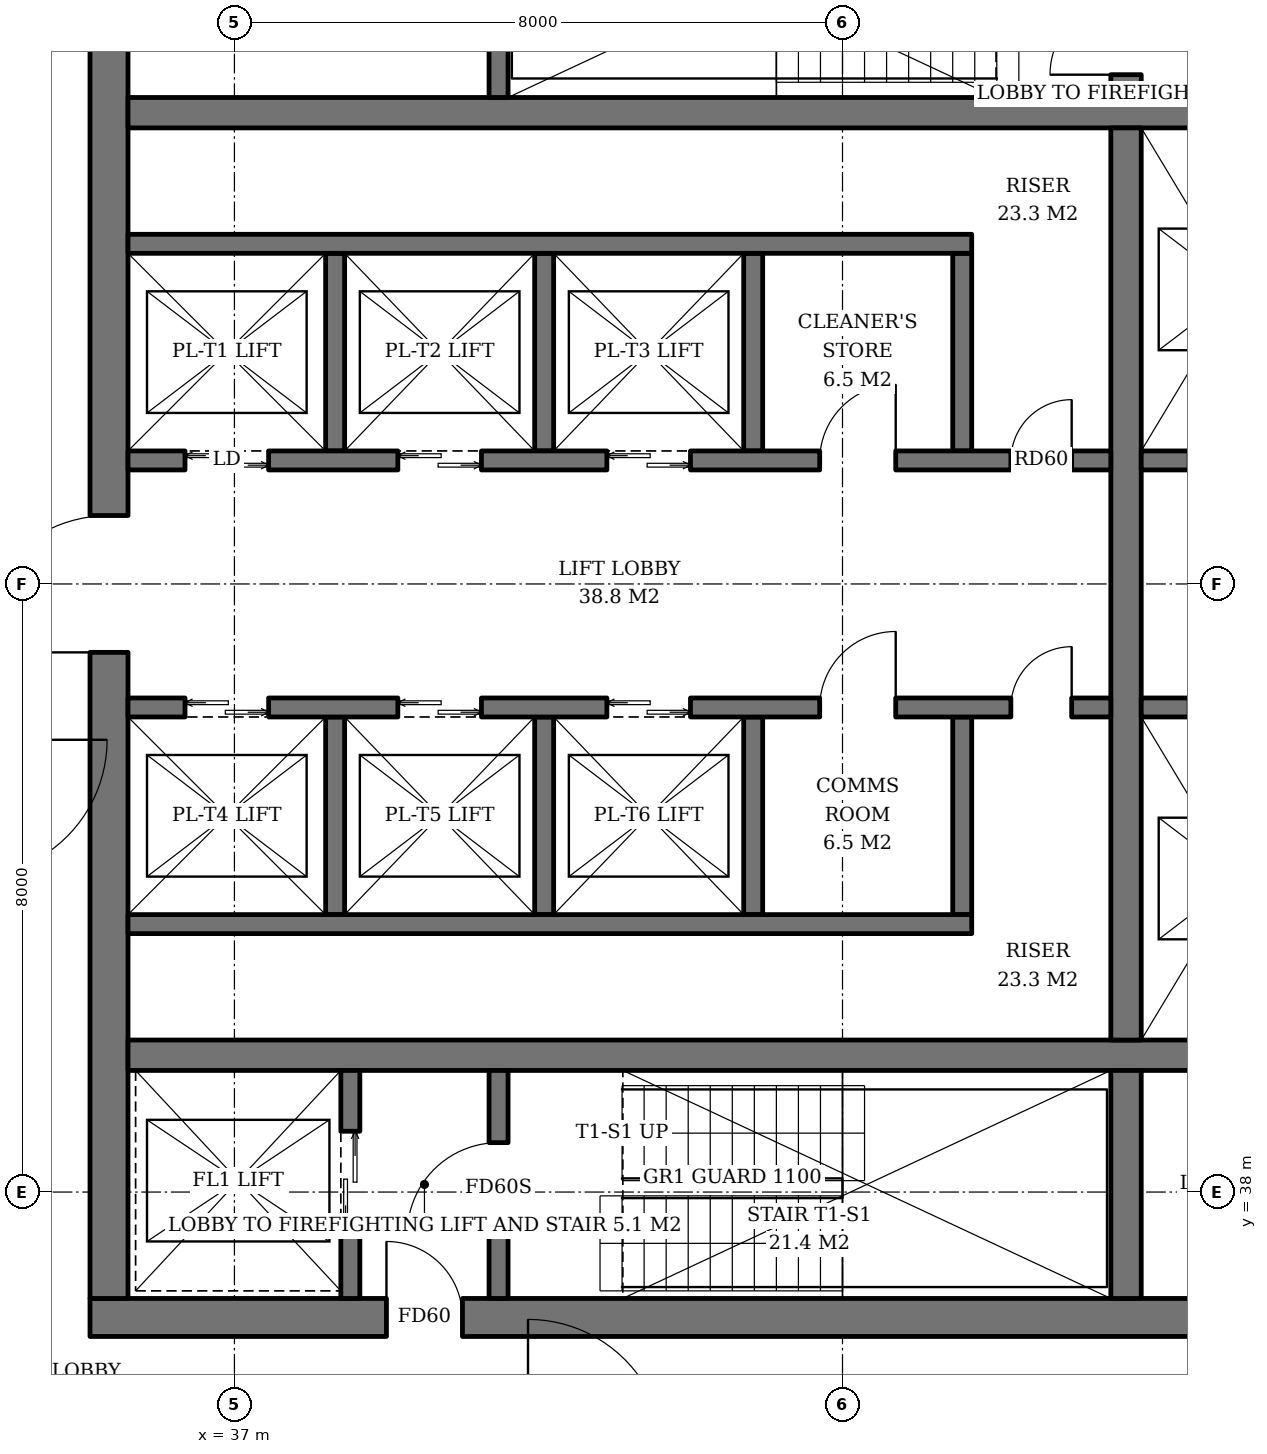
"""IFC4 building model, lengths in metres.
Left out: names, types, materials, properties, quantities, classifications, styles, units other than length and angle.
Written with IfcOpenShell. Run it as: python <this file> out.ifc"""

import sys

from ifc_helpers import new_model, si_unit, direction, frame, frame_2d, origin, place, context, subcontext, project, spatial, rectangle, extrude, element, fill, save


model = new_model("IFC4")
c1 = context("Model", 3, precision=1e-05, world=origin(), true_north=direction((0.0, 1.0)))
c2 = subcontext(c1, "Body", "Model", "MODEL_VIEW")
j1 = project(units=[si_unit("LENGTHUNIT", "METRE"), si_unit("PLANEANGLEUNIT", "RADIAN")], contexts=[c1])
p1 = place(None, origin())
s1 = spatial("IfcSite", under=j1, at=p1, CompositionType="ELEMENT")
p2 = place(p1, origin())
s2 = spatial("IfcBuilding", under=s1, at=p2, CompositionType="ELEMENT")
p3 = place(p2, frame((0.0, 0.0, 233.8)))
s3 = spatial("IfcBuildingStorey", under=s2, at=p3, CompositionType="ELEMENT", Elevation=233.8)
p4 = place(p3, frame((35.1, 36.35, 0.0), z_axis=(0.0, 0.0, 1.0), x_axis=(1.0, 0.0, 0.0)))
e1 = element("IfcWall", 1, at=p4, inside=s3, PredefinedType="SHEAR", context=c2, shape_type="SweptSolid", body=[
    extrude(rectangle(XDim=19.8, YDim=0.5, at=frame_2d((9.9, 0.0))), origin(), (0.0, 0.0, 1.0), 3.8),
])
p5 = place(p4, frame((3.9, 0.0, 0.0)))
e2 = element("IfcOpeningElement", 2, at=p5, cuts=e1, PredefinedType="OPENING", context=c2, shape_type="SweptSolid", body=[
    extrude(rectangle(XDim=1.0, YDim=2.1, at=frame_2d((0.5, 1.05))), frame((0.0, 0.26, 0.0), z_axis=(0.0, -1.0, 0.0), x_axis=(1.0, 0.0, 0.0)), (0.0, 0.0, 1.0), 0.52),
])
p6 = place(p4, frame((15.35, 0.0, 0.0)))
e3 = element("IfcOpeningElement", 3, at=p6, cuts=e1, PredefinedType="OPENING", context=c2, shape_type="SweptSolid", body=[
    extrude(rectangle(XDim=1.0, YDim=2.1, at=frame_2d((0.5, 1.05))), frame((0.0, 0.26, 0.0), z_axis=(0.0, -1.0, 0.0), x_axis=(1.0, 0.0, 0.0)), (0.0, 0.0, 1.0), 0.52),
])
p7 = place(p3, frame((35.35, 36.6, 0.0), z_axis=(0.0, 0.0, 1.0), x_axis=(0.0, 1.0, 0.0)))
e4 = element("IfcWall", 4, at=p7, inside=s3, PredefinedType="SHEAR", context=c2, shape_type="SweptSolid", body=[
    extrude(rectangle(XDim=18.8, YDim=0.5, at=frame_2d((9.4, 0.0))), origin(), (0.0, 0.0, 1.0), 3.8),
])
p8 = place(p7, frame((8.5, 0.0, 0.0)))
e5 = element("IfcOpeningElement", 5, at=p8, cuts=e4, PredefinedType="OPENING", context=c2, shape_type="SweptSolid", body=[
    extrude(rectangle(XDim=1.8, YDim=2.4, at=frame_2d((0.9, 1.2))), frame((0.0, 0.26, 0.0), z_axis=(0.0, -1.0, 0.0), x_axis=(1.0, 0.0, 0.0)), (0.0, 0.0, 1.0), 0.52),
])
for number, where, z_axis, x_axis in (
    (6, (35.6, 39.8, 0.0), (0.0, 0.0, 1.0), (1.0, 0.0, 0.0)),
    (7, (35.6, 52.2, 0.0), (0.0, 0.0, 1.0), (1.0, 0.0, 0.0)),
):
    element("IfcWall", number, at=place(p3, frame(where, z_axis=z_axis, x_axis=x_axis)), inside=s3, PredefinedType="SHEAR", context=c2, shape_type="SweptSolid", body=[
        extrude(rectangle(XDim=18.8, YDim=0.4, at=frame_2d((9.4, 0.0))), origin(), (0.0, 0.0, 1.0), 3.8),
    ])
p9 = place(p3, frame((48.73, 36.6, 0.0), z_axis=(0.0, 0.0, 1.0), x_axis=(0.0, 1.0, 0.0)))
e8 = element("IfcWall", 8, at=p9, inside=s3, PredefinedType="SHEAR", context=c2, shape_type="SweptSolid", body=[
    extrude(rectangle(XDim=3.0, YDim=0.4, at=frame_2d((1.5, 0.0))), origin(), (0.0, 0.0, 1.0), 3.8),
])
p10 = place(p3, frame((48.73, 40.0, 0.0), z_axis=(0.0, 0.0, 1.0), x_axis=(0.0, 1.0, 0.0)))
e9 = element("IfcWall", 9, at=p10, inside=s3, PredefinedType="SHEAR", context=c2, shape_type="SweptSolid", body=[
    extrude(rectangle(XDim=12.0, YDim=0.4, at=frame_2d((6.0, 0.0))), origin(), (0.0, 0.0, 1.0), 3.8),
])
p11 = place(p3, frame((48.73, 52.4, 0.0), z_axis=(0.0, 0.0, 1.0), x_axis=(0.0, 1.0, 0.0)))
e10 = element("IfcWall", 10, at=p11, inside=s3, PredefinedType="SHEAR", context=c2, shape_type="SweptSolid", body=[
    extrude(rectangle(XDim=3.0, YDim=0.4, at=frame_2d((1.5, 0.0))), origin(), (0.0, 0.0, 1.0), 3.8),
])
p12 = place(p11, frame((0.3, 0.0, 0.0)))
e11 = element("IfcOpeningElement", 11, at=p12, cuts=e10, PredefinedType="OPENING", context=c2, shape_type="SweptSolid", body=[
    extrude(rectangle(XDim=1.0, YDim=2.1, at=frame_2d((0.5, 1.05))), frame((0.0, 0.21, 0.0), z_axis=(0.0, -1.0, 0.0), x_axis=(1.0, 0.0, 0.0)), (0.0, 0.0, 1.0), 0.42),
])
p13 = place(p3, frame((38.525, 36.6, 0.0), z_axis=(0.0, 0.0, 1.0), x_axis=(0.0, 1.0, 0.0)))
e12 = element("IfcWall", 12, at=p13, inside=s3, PredefinedType="SHEAR", context=c2, shape_type="SweptSolid", body=[
    extrude(rectangle(XDim=3.0, YDim=0.25, at=frame_2d((1.5, 0.0))), origin(), (0.0, 0.0, 1.0), 3.8),
])
p14 = place(p13, frame((0.9, 0.0, 0.0)))
e13 = element("IfcOpeningElement", 13, at=p14, cuts=e12, PredefinedType="OPENING", context=c2, shape_type="SweptSolid", body=[
    extrude(rectangle(XDim=1.3, YDim=2.2, at=frame_2d((0.65, 1.1))), frame((0.0, 0.135, 0.0), z_axis=(0.0, -1.0, 0.0), x_axis=(1.0, 0.0, 0.0)), (0.0, 0.0, 1.0), 0.27),
])
p15 = place(p3, frame((40.475, 36.6, 0.0), z_axis=(0.0, 0.0, 1.0), x_axis=(0.0, 1.0, 0.0)))
e14 = element("IfcWall", 14, at=p15, inside=s3, PredefinedType="SHEAR", context=c2, shape_type="SweptSolid", body=[
    extrude(rectangle(XDim=3.0, YDim=0.25, at=frame_2d((1.5, 0.0))), origin(), (0.0, 0.0, 1.0), 3.8),
])
p16 = place(p15, frame((0.85, 0.0, 0.0)))
e15 = element("IfcOpeningElement", 15, at=p16, cuts=e14, PredefinedType="OPENING", context=c2, shape_type="SweptSolid", body=[
    extrude(rectangle(XDim=1.2, YDim=2.1, at=frame_2d((0.6, 1.05))), frame((0.0, 0.135, 0.0), z_axis=(0.0, -1.0, 0.0), x_axis=(1.0, 0.0, 0.0)), (0.0, 0.0, 1.0), 0.27),
])
p17 = place(p3, frame((40.475, 52.4, 0.0), z_axis=(0.0, 0.0, 1.0), x_axis=(0.0, 1.0, 0.0)))
e16 = element("IfcWall", 16, at=p17, inside=s3, PredefinedType="SHEAR", context=c2, shape_type="SweptSolid", body=[
    extrude(rectangle(XDim=3.0, YDim=0.25, at=frame_2d((1.5, 0.0))), origin(), (0.0, 0.0, 1.0), 3.8),
])
for number, where, z_axis, x_axis in (
    (17, (38.325, 47.75, 0.0), (0.0, 0.0, 1.0), (0.0, 1.0, 0.0)),
    (18, (41.075, 47.75, 0.0), (0.0, 0.0, 1.0), (0.0, 1.0, 0.0)),
    (19, (43.825, 47.75, 0.0), (0.0, 0.0, 1.0), (0.0, 1.0, 0.0)),
    (20, (46.575, 47.75, 0.0), (0.0, 0.0, 1.0), (0.0, 1.0, 0.0)),
):
    element("IfcWall", number, at=place(p3, frame(where, z_axis=z_axis, x_axis=x_axis)), inside=s3, PredefinedType="SHEAR", context=c2, shape_type="SweptSolid", body=[
        extrude(rectangle(XDim=2.6, YDim=0.25, at=frame_2d((1.3, 0.0))), origin(), (0.0, 0.0, 1.0), 3.8),
    ])
p18 = place(p3, frame((35.6, 50.475, 0.0), z_axis=(0.0, 0.0, 1.0), x_axis=(1.0, 0.0, 0.0)))
e21 = element("IfcWall", 21, at=p18, inside=s3, PredefinedType="SHEAR", context=c2, shape_type="SweptSolid", body=[
    extrude(rectangle(XDim=11.1, YDim=0.25, at=frame_2d((5.55, 0.0))), origin(), (0.0, 0.0, 1.0), 3.8),
])
p19 = place(p3, frame((35.6, 47.625, 0.0), z_axis=(0.0, 0.0, 1.0), x_axis=(1.0, 0.0, 0.0)))
e22 = element("IfcWall", 22, at=p19, inside=s3, PredefinedType="SHEAR", context=c2, shape_type="SweptSolid", body=[
    extrude(rectangle(XDim=12.93, YDim=0.25, at=frame_2d((6.465, 0.0))), origin(), (0.0, 0.0, 1.0), 3.8),
])
p20 = place(p19, frame((0.75, 0.0, 0.0)))
e23 = element("IfcOpeningElement", 23, at=p20, cuts=e22, PredefinedType="OPENING", context=c2, shape_type="SweptSolid", body=[
    extrude(rectangle(XDim=1.1, YDim=2.2, at=frame_2d((0.55, 1.1))), frame((0.0, 0.135, 0.0), z_axis=(0.0, -1.0, 0.0), x_axis=(1.0, 0.0, 0.0)), (0.0, 0.0, 1.0), 0.27),
])
p21 = place(p19, frame((3.55, 0.0, 0.0)))
e24 = element("IfcOpeningElement", 24, at=p21, cuts=e22, PredefinedType="OPENING", context=c2, shape_type="SweptSolid", body=[
    extrude(rectangle(XDim=1.1, YDim=2.2, at=frame_2d((0.55, 1.1))), frame((0.0, 0.135, 0.0), z_axis=(0.0, -1.0, 0.0), x_axis=(1.0, 0.0, 0.0)), (0.0, 0.0, 1.0), 0.27),
])
p22 = place(p19, frame((6.3, 0.0, 0.0)))
e25 = element("IfcOpeningElement", 25, at=p22, cuts=e22, PredefinedType="OPENING", context=c2, shape_type="SweptSolid", body=[
    extrude(rectangle(XDim=1.1, YDim=2.2, at=frame_2d((0.55, 1.1))), frame((0.0, 0.135, 0.0), z_axis=(0.0, -1.0, 0.0), x_axis=(1.0, 0.0, 0.0)), (0.0, 0.0, 1.0), 0.27),
])
p23 = place(p19, frame((9.1, 0.0, 0.0)))
e26 = element("IfcOpeningElement", 26, at=p23, cuts=e22, PredefinedType="OPENING", context=c2, shape_type="SweptSolid", body=[
    extrude(rectangle(XDim=1.0, YDim=2.1, at=frame_2d((0.5, 1.05))), frame((0.0, 0.135, 0.0), z_axis=(0.0, -1.0, 0.0), x_axis=(1.0, 0.0, 0.0)), (0.0, 0.0, 1.0), 0.27),
])
p24 = place(p19, frame((11.615, 0.0, 0.0)))
e27 = element("IfcOpeningElement", 27, at=p24, cuts=e22, PredefinedType="OPENING", context=c2, shape_type="SweptSolid", body=[
    extrude(rectangle(XDim=0.8, YDim=2.0, at=frame_2d((0.4, 1.0))), frame((0.0, 0.135, 0.0), z_axis=(0.0, -1.0, 0.0), x_axis=(1.0, 0.0, 0.0)), (0.0, 0.0, 1.0), 0.27),
])
for number, where, z_axis, x_axis in (
    (28, (38.325, 44.25, 0.0), (0.0, 0.0, 1.0), (0.0, -1.0, 0.0)),
    (29, (41.075, 44.25, 0.0), (0.0, 0.0, 1.0), (0.0, -1.0, 0.0)),
    (30, (43.825, 44.25, 0.0), (0.0, 0.0, 1.0), (0.0, -1.0, 0.0)),
    (31, (46.575, 44.25, 0.0), (0.0, 0.0, 1.0), (0.0, -1.0, 0.0)),
):
    element("IfcWall", number, at=place(p3, frame(where, z_axis=z_axis, x_axis=x_axis)), inside=s3, PredefinedType="SHEAR", context=c2, shape_type="SweptSolid", body=[
        extrude(rectangle(XDim=2.6, YDim=0.25, at=frame_2d((1.3, 0.0))), origin(), (0.0, 0.0, 1.0), 3.8),
    ])
p25 = place(p3, frame((35.6, 41.525, 0.0), z_axis=(0.0, 0.0, 1.0), x_axis=(1.0, 0.0, 0.0)))
e32 = element("IfcWall", 32, at=p25, inside=s3, PredefinedType="SHEAR", context=c2, shape_type="SweptSolid", body=[
    extrude(rectangle(XDim=11.1, YDim=0.25, at=frame_2d((5.55, 0.0))), origin(), (0.0, 0.0, 1.0), 3.8),
])
p26 = place(p3, frame((35.6, 44.375, 0.0), z_axis=(0.0, 0.0, 1.0), x_axis=(1.0, 0.0, 0.0)))
e33 = element("IfcWall", 33, at=p26, inside=s3, PredefinedType="SHEAR", context=c2, shape_type="SweptSolid", body=[
    extrude(rectangle(XDim=12.93, YDim=0.25, at=frame_2d((6.465, 0.0))), origin(), (0.0, 0.0, 1.0), 3.8),
])
p27 = place(p26, frame((0.75, 0.0, 0.0)))
e34 = element("IfcOpeningElement", 34, at=p27, cuts=e33, PredefinedType="OPENING", context=c2, shape_type="SweptSolid", body=[
    extrude(rectangle(XDim=1.1, YDim=2.2, at=frame_2d((0.55, 1.1))), frame((0.0, 0.135, 0.0), z_axis=(0.0, -1.0, 0.0), x_axis=(1.0, 0.0, 0.0)), (0.0, 0.0, 1.0), 0.27),
])
p28 = place(p26, frame((3.55, 0.0, 0.0)))
e35 = element("IfcOpeningElement", 35, at=p28, cuts=e33, PredefinedType="OPENING", context=c2, shape_type="SweptSolid", body=[
    extrude(rectangle(XDim=1.1, YDim=2.2, at=frame_2d((0.55, 1.1))), frame((0.0, 0.135, 0.0), z_axis=(0.0, -1.0, 0.0), x_axis=(1.0, 0.0, 0.0)), (0.0, 0.0, 1.0), 0.27),
])
p29 = place(p26, frame((6.3, 0.0, 0.0)))
e36 = element("IfcOpeningElement", 36, at=p29, cuts=e33, PredefinedType="OPENING", context=c2, shape_type="SweptSolid", body=[
    extrude(rectangle(XDim=1.1, YDim=2.2, at=frame_2d((0.55, 1.1))), frame((0.0, 0.135, 0.0), z_axis=(0.0, -1.0, 0.0), x_axis=(1.0, 0.0, 0.0)), (0.0, 0.0, 1.0), 0.27),
])
p30 = place(p26, frame((9.1, 0.0, 0.0)))
e37 = element("IfcOpeningElement", 37, at=p30, cuts=e33, PredefinedType="OPENING", context=c2, shape_type="SweptSolid", body=[
    extrude(rectangle(XDim=1.0, YDim=2.1, at=frame_2d((0.5, 1.05))), frame((0.0, 0.135, 0.0), z_axis=(0.0, -1.0, 0.0), x_axis=(1.0, 0.0, 0.0)), (0.0, 0.0, 1.0), 0.27),
])
p31 = place(p26, frame((11.615, 0.0, 0.0)))
e38 = element("IfcOpeningElement", 38, at=p31, cuts=e33, PredefinedType="OPENING", context=c2, shape_type="SweptSolid", body=[
    extrude(rectangle(XDim=0.8, YDim=2.0, at=frame_2d((0.4, 1.0))), frame((0.0, 0.135, 0.0), z_axis=(0.0, -1.0, 0.0), x_axis=(1.0, 0.0, 0.0)), (0.0, 0.0, 1.0), 0.27),
])
p32 = place(p3, frame((48.93, 47.625, 0.0), z_axis=(0.0, 0.0, 1.0), x_axis=(1.0, 0.0, 0.0)))
e39 = element("IfcWall", 39, at=p32, inside=s3, PredefinedType="SHEAR", context=c2, shape_type="SweptSolid", body=[
    extrude(rectangle(XDim=5.47, YDim=0.25, at=frame_2d((2.735, 0.0))), origin(), (0.0, 0.0, 1.0), 3.8),
])
p33 = place(p32, frame((0.63, 0.0, 0.0)))
e40 = element("IfcOpeningElement", 40, at=p33, cuts=e39, PredefinedType="OPENING", context=c2, shape_type="SweptSolid", body=[
    extrude(rectangle(XDim=1.3, YDim=2.2, at=frame_2d((0.65, 1.1))), frame((0.0, 0.135, 0.0), z_axis=(0.0, -1.0, 0.0), x_axis=(1.0, 0.0, 0.0)), (0.0, 0.0, 1.0), 0.27),
])
p34 = place(p32, frame((3.49, 0.0, 0.0)))
e41 = element("IfcOpeningElement", 41, at=p34, cuts=e39, PredefinedType="OPENING", context=c2, shape_type="SweptSolid", body=[
    extrude(rectangle(XDim=1.3, YDim=2.2, at=frame_2d((0.65, 1.1))), frame((0.0, 0.135, 0.0), z_axis=(0.0, -1.0, 0.0), x_axis=(1.0, 0.0, 0.0)), (0.0, 0.0, 1.0), 0.27),
])
p35 = place(p3, frame((48.93, 44.375, 0.0), z_axis=(0.0, 0.0, 1.0), x_axis=(1.0, 0.0, 0.0)))
e42 = element("IfcWall", 42, at=p35, inside=s3, PredefinedType="SHEAR", context=c2, shape_type="SweptSolid", body=[
    extrude(rectangle(XDim=5.47, YDim=0.25, at=frame_2d((2.735, 0.0))), origin(), (0.0, 0.0, 1.0), 3.8),
])
p36 = place(p35, frame((0.63, 0.0, 0.0)))
e43 = element("IfcOpeningElement", 43, at=p36, cuts=e42, PredefinedType="OPENING", context=c2, shape_type="SweptSolid", body=[
    extrude(rectangle(XDim=1.3, YDim=2.2, at=frame_2d((0.65, 1.1))), frame((0.0, 0.135, 0.0), z_axis=(0.0, -1.0, 0.0), x_axis=(1.0, 0.0, 0.0)), (0.0, 0.0, 1.0), 0.27),
])
p37 = place(p35, frame((3.49, 0.0, 0.0)))
e44 = element("IfcOpeningElement", 44, at=p37, cuts=e42, PredefinedType="OPENING", context=c2, shape_type="SweptSolid", body=[
    extrude(rectangle(XDim=1.3, YDim=2.2, at=frame_2d((0.65, 1.1))), frame((0.0, 0.135, 0.0), z_axis=(0.0, -1.0, 0.0), x_axis=(1.0, 0.0, 0.0)), (0.0, 0.0, 1.0), 0.27),
])
p38 = place(p14, origin())
e45 = element("IfcDoor", 45, at=p38, inside=s3, OperationType="DOUBLE_DOOR_SLIDING", PredefinedType="DOOR", context=c2, shape_type="SweptSolid", body=[
    extrude(rectangle(XDim=1.3, YDim=2.2, at=frame_2d((0.65, 1.1))), frame((0.0, 0.025, 0.0), z_axis=(0.0, -1.0, 0.0), x_axis=(1.0, 0.0, 0.0)), (0.0, 0.0, 1.0), 0.05),
])
fill(e13, e45)
p39 = place(p16, origin())
e46 = element("IfcDoor", 46, at=p39, inside=s3, OperationType="SINGLE_SWING_LEFT", PredefinedType="DOOR", context=c2, shape_type="SweptSolid", body=[
    extrude(rectangle(XDim=1.2, YDim=2.1, at=frame_2d((0.6, 1.05))), frame((0.0, 0.025, 0.0), z_axis=(0.0, -1.0, 0.0), x_axis=(1.0, 0.0, 0.0)), (0.0, 0.0, 1.0), 0.05),
])
fill(e15, e46)
p40 = place(p20, origin())
e47 = element("IfcDoor", 47, at=p40, inside=s3, OperationType="DOUBLE_DOOR_SLIDING", PredefinedType="DOOR", context=c2, shape_type="SweptSolid", body=[
    extrude(rectangle(XDim=1.1, YDim=2.2, at=frame_2d((0.55, 1.1))), frame((0.0, 0.025, 0.0), z_axis=(0.0, -1.0, 0.0), x_axis=(1.0, 0.0, 0.0)), (0.0, 0.0, 1.0), 0.05),
])
fill(e23, e47)
p41 = place(p21, origin())
e48 = element("IfcDoor", 48, at=p41, inside=s3, OperationType="DOUBLE_DOOR_SLIDING", PredefinedType="DOOR", context=c2, shape_type="SweptSolid", body=[
    extrude(rectangle(XDim=1.1, YDim=2.2, at=frame_2d((0.55, 1.1))), frame((0.0, 0.025, 0.0), z_axis=(0.0, -1.0, 0.0), x_axis=(1.0, 0.0, 0.0)), (0.0, 0.0, 1.0), 0.05),
])
fill(e24, e48)
p42 = place(p22, origin())
e49 = element("IfcDoor", 49, at=p42, inside=s3, OperationType="DOUBLE_DOOR_SLIDING", PredefinedType="DOOR", context=c2, shape_type="SweptSolid", body=[
    extrude(rectangle(XDim=1.1, YDim=2.2, at=frame_2d((0.55, 1.1))), frame((0.0, 0.025, 0.0), z_axis=(0.0, -1.0, 0.0), x_axis=(1.0, 0.0, 0.0)), (0.0, 0.0, 1.0), 0.05),
])
fill(e25, e49)
p43 = place(p23, origin())
e50 = element("IfcDoor", 50, at=p43, inside=s3, OperationType="SINGLE_SWING_RIGHT", PredefinedType="DOOR", context=c2, shape_type="SweptSolid", body=[
    extrude(rectangle(XDim=1.0, YDim=2.1, at=frame_2d((0.5, 1.05))), frame((0.0, 0.025, 0.0), z_axis=(0.0, -1.0, 0.0), x_axis=(1.0, 0.0, 0.0)), (0.0, 0.0, 1.0), 0.05),
])
fill(e26, e50)
p44 = place(p24, origin())
e51 = element("IfcDoor", 51, at=p44, inside=s3, OperationType="SINGLE_SWING_RIGHT", PredefinedType="DOOR", context=c2, shape_type="SweptSolid", body=[
    extrude(rectangle(XDim=0.8, YDim=2.0, at=frame_2d((0.4, 1.0))), frame((0.0, 0.025, 0.0), z_axis=(0.0, -1.0, 0.0), x_axis=(1.0, 0.0, 0.0)), (0.0, 0.0, 1.0), 0.05),
])
fill(e27, e51)
p45 = place(p27, origin())
e52 = element("IfcDoor", 52, at=p45, inside=s3, OperationType="DOUBLE_DOOR_SLIDING", PredefinedType="DOOR", context=c2, shape_type="SweptSolid", body=[
    extrude(rectangle(XDim=1.1, YDim=2.2, at=frame_2d((0.55, 1.1))), frame((0.0, 0.025, 0.0), z_axis=(0.0, -1.0, 0.0), x_axis=(1.0, 0.0, 0.0)), (0.0, 0.0, 1.0), 0.05),
])
fill(e34, e52)
p46 = place(p28, origin())
e53 = element("IfcDoor", 53, at=p46, inside=s3, OperationType="DOUBLE_DOOR_SLIDING", PredefinedType="DOOR", context=c2, shape_type="SweptSolid", body=[
    extrude(rectangle(XDim=1.1, YDim=2.2, at=frame_2d((0.55, 1.1))), frame((0.0, 0.025, 0.0), z_axis=(0.0, -1.0, 0.0), x_axis=(1.0, 0.0, 0.0)), (0.0, 0.0, 1.0), 0.05),
])
fill(e35, e53)
p47 = place(p29, origin())
e54 = element("IfcDoor", 54, at=p47, inside=s3, OperationType="DOUBLE_DOOR_SLIDING", PredefinedType="DOOR", context=c2, shape_type="SweptSolid", body=[
    extrude(rectangle(XDim=1.1, YDim=2.2, at=frame_2d((0.55, 1.1))), frame((0.0, 0.025, 0.0), z_axis=(0.0, -1.0, 0.0), x_axis=(1.0, 0.0, 0.0)), (0.0, 0.0, 1.0), 0.05),
])
fill(e36, e54)
p48 = place(p30, origin())
e55 = element("IfcDoor", 55, at=p48, inside=s3, OperationType="SINGLE_SWING_RIGHT", PredefinedType="DOOR", context=c2, shape_type="SweptSolid", body=[
    extrude(rectangle(XDim=1.0, YDim=2.1, at=frame_2d((0.5, 1.05))), frame((0.0, 0.025, 0.0), z_axis=(0.0, -1.0, 0.0), x_axis=(1.0, 0.0, 0.0)), (0.0, 0.0, 1.0), 0.05),
])
fill(e37, e55)
p49 = place(p31, origin())
e56 = element("IfcDoor", 56, at=p49, inside=s3, OperationType="SINGLE_SWING_RIGHT", PredefinedType="DOOR", context=c2, shape_type="SweptSolid", body=[
    extrude(rectangle(XDim=0.8, YDim=2.0, at=frame_2d((0.4, 1.0))), frame((0.0, 0.025, 0.0), z_axis=(0.0, -1.0, 0.0), x_axis=(1.0, 0.0, 0.0)), (0.0, 0.0, 1.0), 0.05),
])
fill(e38, e56)
p50 = place(p12, origin())
e57 = element("IfcDoor", 57, at=p50, inside=s3, OperationType="SINGLE_SWING_LEFT", PredefinedType="DOOR", context=c2, shape_type="SweptSolid", body=[
    extrude(rectangle(XDim=1.0, YDim=2.1, at=frame_2d((0.5, 1.05))), frame((0.0, 0.025, 0.0), z_axis=(0.0, -1.0, 0.0), x_axis=(1.0, 0.0, 0.0)), (0.0, 0.0, 1.0), 0.05),
])
fill(e11, e57)
p51 = place(p5, origin())
e58 = element("IfcDoor", 58, at=p51, inside=s3, OperationType="SINGLE_SWING_LEFT", PredefinedType="DOOR", context=c2, shape_type="SweptSolid", body=[
    extrude(rectangle(XDim=1.0, YDim=2.1, at=frame_2d((0.5, 1.05))), frame((0.0, 0.025, 0.0), z_axis=(0.0, -1.0, 0.0), x_axis=(1.0, 0.0, 0.0)), (0.0, 0.0, 1.0), 0.05),
])
fill(e2, e58)
p52 = place(p8, origin())
e59 = element("IfcDoor", 59, at=p52, inside=s3, OperationType="DOUBLE_DOOR_SINGLE_SWING", PredefinedType="DOOR", context=c2, shape_type="SweptSolid", body=[
    extrude(rectangle(XDim=1.8, YDim=2.4, at=frame_2d((0.9, 1.2))), frame((0.0, 0.025, 0.0), z_axis=(0.0, -1.0, 0.0), x_axis=(1.0, 0.0, 0.0)), (0.0, 0.0, 1.0), 0.05),
])
fill(e5, e59)
save(model, sys.argv[1])
